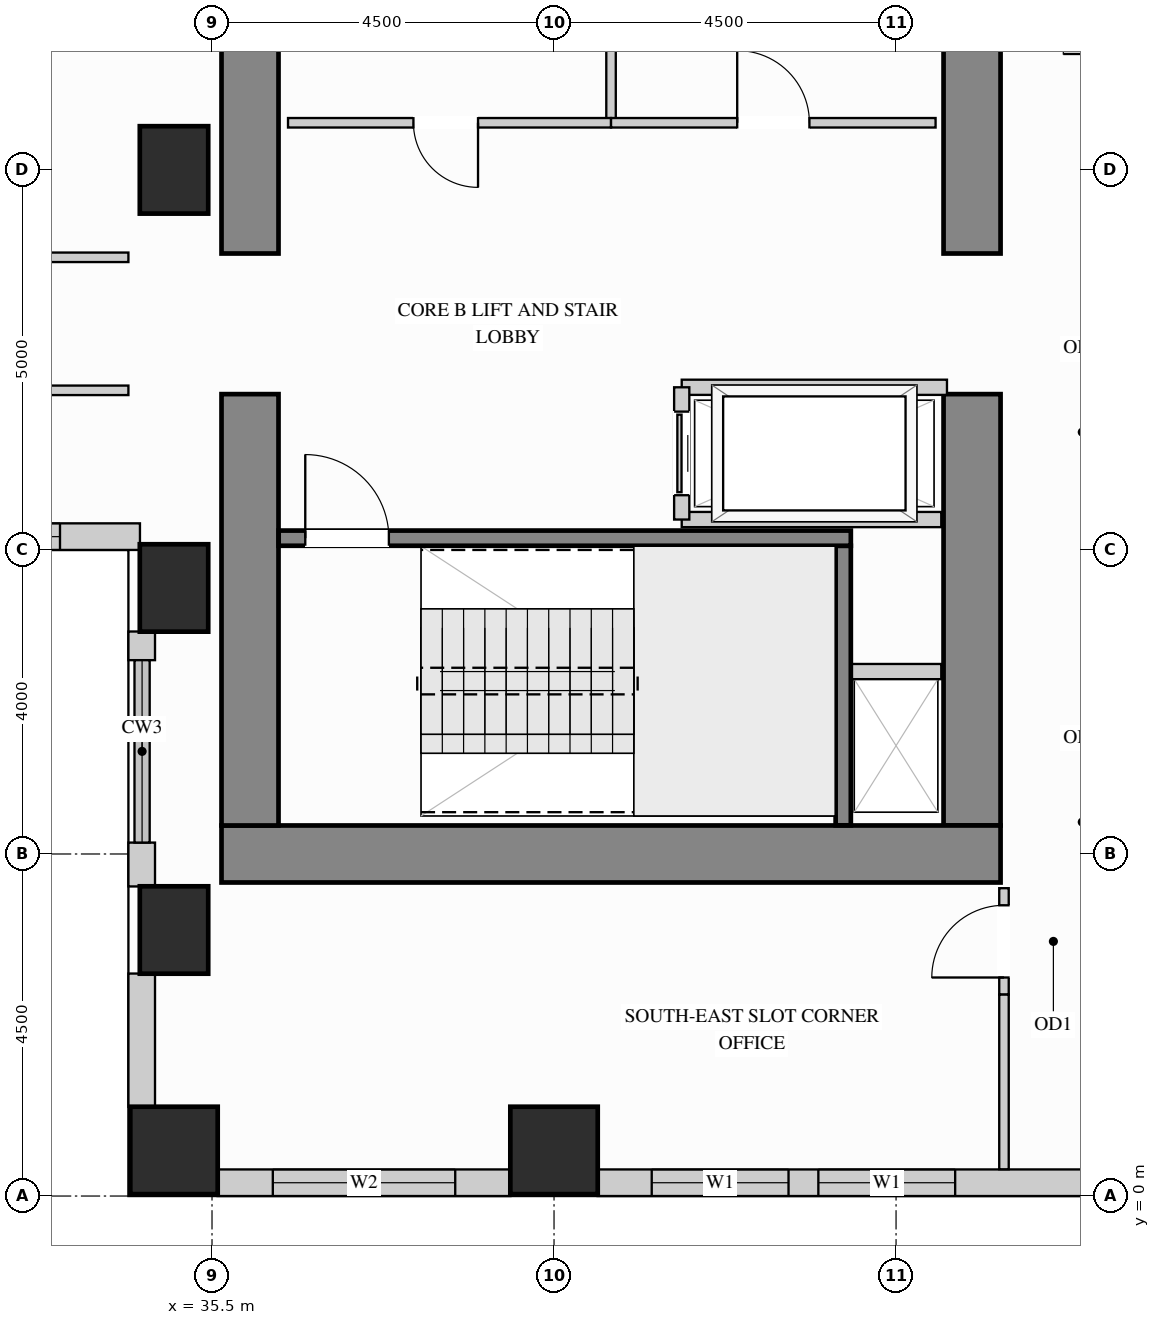
"""IFC4 building model, lengths in metres.
Left out: names, types, materials, properties, quantities, classifications, styles, units other than length and angle.
Written with IfcOpenShell. Run it as: python <this file> out.ifc"""

import sys

from ifc_helpers import new_model, si_unit, direction, frame, frame_2d, origin, origin_2d, place, context, subcontext, project, spatial, rectangle, extrude, source, transform, mapped, element, fill, save


model = new_model("IFC4")
c1 = context("Model", 3, precision=1e-05, world=origin(), true_north=direction((0.0, 1.0)))
c2 = subcontext(c1, "Body", "Model", "MODEL_VIEW")
j1 = project(units=[si_unit("LENGTHUNIT", "METRE"), si_unit("PLANEANGLEUNIT", "RADIAN")], contexts=[c1])
p1 = place(None, origin())
s1 = spatial("IfcSite", under=j1, at=p1, CompositionType="ELEMENT")
p2 = place(p1, origin())
s2 = spatial("IfcBuilding", under=s1, at=p2, CompositionType="ELEMENT")
p3 = place(p2, frame((0.0, 0.0, 117.0)))
s3 = spatial("IfcBuildingStorey", under=s2, at=p3, CompositionType="ELEMENT", Elevation=117.0)
m1 = source(origin(), c2, "Body", "SweptSolid", [
    extrude(rectangle(XDim=0.9, YDim=1.15, at=origin_2d()), origin(), (0.0, 0.0, 1.0), 3.38),
])
for number, where, z_axis, x_axis in (
    (1, (35.0, 13.5, 0.0), (0.0, 0.0, 1.0), (1.0, 0.0, 0.0)),
    (2, (35.0, 3.5, 0.0), (0.0, 0.0, 1.0), (1.0, 0.0, 0.0)),
    (3, (35.0, 8.0, 0.0), (0.0, 0.0, 1.0), (1.0, 0.0, 0.0)),
):
    element("IfcColumn", number, at=place(p3, frame(where, z_axis=z_axis, x_axis=x_axis)), inside=s3, PredefinedType="COLUMN", context=c2, shape_type="MappedRepresentation", body=[
        mapped(m1, transform((0.0, 0.0, 0.0), x_axis=(1.0, 0.0, 0.0), y_axis=(0.0, 1.0, 0.0), z_axis=(0.0, 0.0, 1.0))),
    ])
m2 = source(origin(), c2, "Body", "SweptSolid", [
    extrude(rectangle(XDim=1.15, YDim=1.15, at=origin_2d()), origin(), (0.0, 0.0, 1.0), 3.38),
])
for number, where, z_axis, x_axis in (
    (4, (35.0, 0.6, 0.0), (0.0, 0.0, 1.0), (1.0, 0.0, 0.0)),
    (5, (40.0, 0.6, 0.0), (0.0, 0.0, 1.0), (1.0, 0.0, 0.0)),
):
    element("IfcColumn", number, at=place(p3, frame(where, z_axis=z_axis, x_axis=x_axis)), inside=s3, PredefinedType="COLUMN", context=c2, shape_type="MappedRepresentation", body=[
        mapped(m2, transform((0.0, 0.0, 0.0), x_axis=(1.0, 0.0, 0.0), y_axis=(0.0, 1.0, 0.0), z_axis=(0.0, 0.0, 1.0))),
    ])
m3 = source(origin(), c2, "Body", "SweptSolid", [
    extrude(rectangle(XDim=5.675, YDim=0.75, at=frame_2d((2.837, 0.0))), origin(), (0.0, 0.0, 1.0), 3.38),
])
p4 = place(p3, frame((45.5, 4.875, 0.0), z_axis=(0.0, 0.0, 1.0), x_axis=(0.0, 1.0, 0.0)))
e6 = element("IfcWall", 6, at=p4, inside=s3, PredefinedType="SHEAR", context=c2, shape_type="MappedRepresentation", body=[
    mapped(m3, transform((0.0, 0.0, 0.0), x_axis=(1.0, 0.0, 0.0), y_axis=(0.0, 1.0, 0.0), z_axis=(0.0, 0.0, 1.0))),
])
m4 = source(origin(), c2, "Body", "SweptSolid", [
    extrude(rectangle(XDim=3.725, YDim=0.75, at=frame_2d((1.863, 0.0))), origin(), (0.0, 0.0, 1.0), 3.38),
])
p5 = place(p3, frame((45.5, 12.4, 0.0), z_axis=(0.0, 0.0, 1.0), x_axis=(0.0, 1.0, 0.0)))
e7 = element("IfcWall", 7, at=p5, inside=s3, PredefinedType="SHEAR", context=c2, shape_type="MappedRepresentation", body=[
    mapped(m4, transform((0.0, 0.0, 0.0), x_axis=(1.0, 0.0, 0.0), y_axis=(0.0, 1.0, 0.0), z_axis=(0.0, 0.0, 1.0))),
])
m5 = source(origin(), c2, "Body", "SweptSolid", [
    extrude(rectangle(XDim=10.25, YDim=0.75, at=frame_2d((5.125, 0.0))), origin(), (0.0, 0.0, 1.0), 3.38),
])
p6 = place(p3, frame((35.625, 4.5, 0.0), z_axis=(0.0, 0.0, 1.0), x_axis=(1.0, 0.0, 0.0)))
e8 = element("IfcWall", 8, at=p6, inside=s3, PredefinedType="SHEAR", context=c2, shape_type="MappedRepresentation", body=[
    mapped(m5, transform((0.0, 0.0, 0.0), x_axis=(1.0, 0.0, 0.0), y_axis=(0.0, 1.0, 0.0), z_axis=(0.0, 0.0, 1.0))),
])
p7 = place(p3, frame((36.0, 4.875, 0.0), z_axis=(0.0, 0.0, 1.0), x_axis=(0.0, 1.0, 0.0)))
e9 = element("IfcWall", 9, at=p7, inside=s3, PredefinedType="SHEAR", context=c2, shape_type="MappedRepresentation", body=[
    mapped(m3, transform((0.0, 0.0, 0.0), x_axis=(1.0, 0.0, 0.0), y_axis=(0.0, 1.0, 0.0), z_axis=(0.0, 0.0, 1.0))),
])
p8 = place(p3, frame((36.0, 12.4, 0.0), z_axis=(0.0, 0.0, 1.0), x_axis=(0.0, 1.0, 0.0)))
e10 = element("IfcWall", 10, at=p8, inside=s3, PredefinedType="SHEAR", context=c2, shape_type="MappedRepresentation", body=[
    mapped(m4, transform((0.0, 0.0, 0.0), x_axis=(1.0, 0.0, 0.0), y_axis=(0.0, 1.0, 0.0), z_axis=(0.0, 0.0, 1.0))),
])
p9 = place(p3, frame((30.948, 8.675, 0.0), z_axis=(0.0, 0.0, 1.0), x_axis=(1.0, 0.0, 0.0)))
e11 = element("IfcWall", 11, at=p9, inside=s3, PredefinedType="SOLIDWALL", context=c2, shape_type="SweptSolid", body=[
    extrude(rectangle(XDim=3.604, YDim=0.35, at=frame_2d((1.802, 0.0))), origin(), (0.0, 0.0, 1.0), 3.365),
])
p10 = place(p9, frame((1.052, 0.0, 0.78)))
e12 = element("IfcOpeningElement", 12, at=p10, cuts=e11, PredefinedType="OPENING", context=c2, shape_type="SweptSolid", body=[
    extrude(rectangle(XDim=1.5, YDim=2.0, at=frame_2d((0.75, 1.0))), frame((0.0, 0.185, 0.0), z_axis=(0.0, -1.0, 0.0), x_axis=(1.0, 0.0, 0.0)), (0.0, 0.0, 1.0), 0.37),
])
m6 = source(origin(), c2, "Body", "SweptSolid", [
    extrude(rectangle(XDim=0.377, YDim=0.35, at=frame_2d((0.188, 0.0))), origin(), (0.0, 0.0, 1.0), 3.365),
])
p11 = place(p3, frame((34.575, 7.427, 0.0), z_axis=(0.0, 0.0, 1.0), x_axis=(0.0, -1.0, 0.0)))
e13 = element("IfcWall", 13, at=p11, inside=s3, PredefinedType="SOLIDWALL", context=c2, shape_type="MappedRepresentation", body=[
    mapped(m6, transform((0.0, 0.0, 0.0), x_axis=(1.0, 0.0, 0.0), y_axis=(0.0, 1.0, 0.0), z_axis=(0.0, 0.0, 1.0))),
])
m7 = source(origin(), c2, "Body", "SweptSolid", [
    extrude(rectangle(XDim=0.577, YDim=0.35, at=frame_2d((0.289, 0.0))), origin(), (0.0, 0.0, 1.0), 3.365),
])
p12 = place(p3, frame((34.575, 4.65, 0.0), z_axis=(0.0, 0.0, 1.0), x_axis=(0.0, -1.0, 0.0)))
e14 = element("IfcWall", 14, at=p12, inside=s3, PredefinedType="SOLIDWALL", context=c2, shape_type="MappedRepresentation", body=[
    mapped(m7, transform((0.0, 0.0, 0.0), x_axis=(1.0, 0.0, 0.0), y_axis=(0.0, 1.0, 0.0), z_axis=(0.0, 0.0, 1.0))),
])
m8 = source(origin(), c2, "Body", "SweptSolid", [
    extrude(rectangle(XDim=1.754, YDim=0.35, at=frame_2d((0.877, 0.0))), origin(), (0.0, 0.0, 1.0), 3.365),
])
p13 = place(p3, frame((34.575, 2.927, 0.0), z_axis=(0.0, 0.0, 1.0), x_axis=(0.0, -1.0, 0.0)))
e15 = element("IfcWall", 15, at=p13, inside=s3, PredefinedType="SOLIDWALL", context=c2, shape_type="MappedRepresentation", body=[
    mapped(m8, transform((0.0, 0.0, 0.0), x_axis=(1.0, 0.0, 0.0), y_axis=(0.0, 1.0, 0.0), z_axis=(0.0, 0.0, 1.0))),
])
p14 = place(p3, frame((35.573, 0.175, 0.0), z_axis=(0.0, 0.0, 1.0), x_axis=(1.0, 0.0, 0.0)))
e16 = element("IfcWall", 16, at=p14, inside=s3, PredefinedType="SOLIDWALL", context=c2, shape_type="SweptSolid", body=[
    extrude(rectangle(XDim=3.854, YDim=0.35, at=frame_2d((1.927, 0.0))), origin(), (0.0, 0.0, 1.0), 3.365),
])
p15 = place(p14, frame((0.727, 0.0, 0.78)))
e17 = element("IfcOpeningElement", 17, at=p15, cuts=e16, PredefinedType="OPENING", context=c2, shape_type="SweptSolid", body=[
    extrude(rectangle(XDim=2.4, YDim=2.1, at=frame_2d((1.2, 1.05))), frame((0.0, 0.185, 0.0), z_axis=(0.0, -1.0, 0.0), x_axis=(1.0, 0.0, 0.0)), (0.0, 0.0, 1.0), 0.37),
])
p16 = place(p3, frame((40.573, 0.175, 0.0), z_axis=(0.0, 0.0, 1.0), x_axis=(1.0, 0.0, 0.0)))
e18 = element("IfcWall", 18, at=p16, inside=s3, PredefinedType="SOLIDWALL", context=c2, shape_type="SweptSolid", body=[
    extrude(rectangle(XDim=6.454, YDim=0.35, at=frame_2d((3.227, 0.0))), origin(), (0.0, 0.0, 1.0), 3.365),
])
p17 = place(p16, frame((0.712, 0.0, 0.78)))
e19 = element("IfcOpeningElement", 19, at=p17, cuts=e18, PredefinedType="OPENING", context=c2, shape_type="SweptSolid", body=[
    extrude(rectangle(XDim=1.8, YDim=2.1, at=frame_2d((0.9, 1.05))), frame((0.0, 0.185, 0.0), z_axis=(0.0, -1.0, 0.0), x_axis=(1.0, 0.0, 0.0)), (0.0, 0.0, 1.0), 0.37),
])
p18 = place(p16, frame((2.905, 0.0, 0.78)))
e20 = element("IfcOpeningElement", 20, at=p18, cuts=e18, PredefinedType="OPENING", context=c2, shape_type="SweptSolid", body=[
    extrude(rectangle(XDim=1.8, YDim=2.1, at=frame_2d((0.9, 1.05))), frame((0.0, 0.185, 0.0), z_axis=(0.0, -1.0, 0.0), x_axis=(1.0, 0.0, 0.0)), (0.0, 0.0, 1.0), 0.37),
])
m9 = source(origin(), c2, "Body", "SweptSolid", [
    extrude(rectangle(XDim=1.93, YDim=0.125, at=frame_2d((0.965, 0.0))), origin(), (0.0, 0.0, 1.0), 3.365),
])
p19 = place(p3, frame((40.75, 14.12, 0.0), z_axis=(0.0, 0.0, 1.0), x_axis=(0.0, 1.0, 0.0)))
e21 = element("IfcWall", 21, at=p19, inside=s3, PredefinedType="PARTITIONING", context=c2, shape_type="MappedRepresentation", body=[
    mapped(m9, transform((0.0, 0.0, 0.0), x_axis=(1.0, 0.0, 0.0), y_axis=(0.0, 1.0, 0.0), z_axis=(0.0, 0.0, 1.0))),
])
p20 = place(p3, frame((36.5, 14.12, 0.0), z_axis=(0.0, 0.0, 1.0), x_axis=(1.0, 0.0, 0.0)))
e22 = element("IfcWall", 22, at=p20, inside=s3, PredefinedType="PARTITIONING", context=c2, shape_type="SweptSolid", body=[
    extrude(rectangle(XDim=4.25, YDim=0.125, at=frame_2d((2.125, 0.0))), origin(), (0.0, 0.0, 1.0), 3.365),
])
p21 = place(p20, frame((1.65, 0.0, 0.0)))
e23 = element("IfcOpeningElement", 23, at=p21, cuts=e22, PredefinedType="OPENING", context=c2, shape_type="SweptSolid", body=[
    extrude(rectangle(XDim=0.85, YDim=2.1, at=frame_2d((0.425, 1.05))), frame((0.0, 0.073, 0.0), z_axis=(0.0, -1.0, 0.0), x_axis=(1.0, 0.0, 0.0)), (0.0, 0.0, 1.0), 0.145),
])
p22 = place(p3, frame((40.75, 14.12, 0.0), z_axis=(0.0, 0.0, 1.0), x_axis=(1.0, 0.0, 0.0)))
e24 = element("IfcWall", 24, at=p22, inside=s3, PredefinedType="PARTITIONING", context=c2, shape_type="SweptSolid", body=[
    extrude(rectangle(XDim=4.27, YDim=0.125, at=frame_2d((2.135, 0.0))), origin(), (0.0, 0.0, 1.0), 3.365),
])
p23 = place(p22, frame((1.66, 0.0, 0.0)))
e25 = element("IfcOpeningElement", 25, at=p23, cuts=e24, PredefinedType="OPENING", context=c2, shape_type="SweptSolid", body=[
    extrude(rectangle(XDim=0.95, YDim=2.15, at=frame_2d((0.475, 1.075))), frame((0.0, 0.073, 0.0), z_axis=(0.0, -1.0, 0.0), x_axis=(1.0, 0.0, 0.0)), (0.0, 0.0, 1.0), 0.145),
])
p24 = place(p3, frame((45.92, 2.65, 0.0), z_axis=(0.0, 0.0, 1.0), x_axis=(0.0, 1.0, 0.0)))
e26 = element("IfcWall", 26, at=p24, inside=s3, PredefinedType="PARTITIONING", context=c2, shape_type="SweptSolid", body=[
    extrude(rectangle(XDim=1.4, YDim=0.125, at=frame_2d((0.7, 0.0))), origin(), (0.0, 0.0, 1.0), 3.365),
])
p25 = place(p24, frame((0.225, 0.0, 0.0)))
e27 = element("IfcOpeningElement", 27, at=p25, cuts=e26, PredefinedType="OPENING", context=c2, shape_type="SweptSolid", body=[
    extrude(rectangle(XDim=0.95, YDim=2.15, at=frame_2d((0.475, 1.075))), frame((0.0, 0.073, 0.0), z_axis=(0.0, -1.0, 0.0), x_axis=(1.0, 0.0, 0.0)), (0.0, 0.0, 1.0), 0.145),
])
m10 = source(origin(), c2, "Body", "SweptSolid", [
    extrude(rectangle(XDim=2.298, YDim=0.125, at=frame_2d((1.149, 0.0))), origin(), (0.0, 0.0, 1.0), 3.365),
])
p26 = place(p3, frame((45.92, 0.352, 0.0), z_axis=(0.0, 0.0, 1.0), x_axis=(0.0, 1.0, 0.0)))
e28 = element("IfcWall", 28, at=p26, inside=s3, PredefinedType="PARTITIONING", context=c2, shape_type="MappedRepresentation", body=[
    mapped(m10, transform((0.0, 0.0, 0.0), x_axis=(1.0, 0.0, 0.0), y_axis=(0.0, 1.0, 0.0), z_axis=(0.0, 0.0, 1.0))),
])
p27 = place(p3, frame((29.85, 12.35, 0.0), z_axis=(0.0, 0.0, 1.0), x_axis=(1.0, 0.0, 0.0)))
e29 = element("IfcWall", 29, at=p27, inside=s3, PredefinedType="PARTITIONING", context=c2, shape_type="SweptSolid", body=[
    extrude(rectangle(XDim=4.55, YDim=0.125, at=frame_2d((2.275, 0.0))), origin(), (0.0, 0.0, 1.0), 3.365),
])
p28 = place(p27, frame((1.8, 0.0, 0.0)))
e30 = element("IfcOpeningElement", 30, at=p28, cuts=e29, PredefinedType="OPENING", context=c2, shape_type="SweptSolid", body=[
    extrude(rectangle(XDim=0.95, YDim=2.15, at=frame_2d((0.475, 1.075))), frame((0.0, 0.073, 0.0), z_axis=(0.0, -1.0, 0.0), x_axis=(1.0, 0.0, 0.0)), (0.0, 0.0, 1.0), 0.145),
])
p29 = place(p3, frame((19.5, 10.6, 0.0), z_axis=(0.0, 0.0, 1.0), x_axis=(1.0, 0.0, 0.0)))
e31 = element("IfcWall", 31, at=p29, inside=s3, PredefinedType="PARTITIONING", context=c2, shape_type="SweptSolid", body=[
    extrude(rectangle(XDim=14.9, YDim=0.125, at=frame_2d((7.45, 0.0))), origin(), (0.0, 0.0, 1.0), 3.365),
])
p30 = place(p29, frame((6.975, 0.0, 0.0)))
e32 = element("IfcOpeningElement", 32, at=p30, cuts=e31, PredefinedType="OPENING", context=c2, shape_type="SweptSolid", body=[
    extrude(rectangle(XDim=0.95, YDim=2.15, at=frame_2d((0.475, 1.075))), frame((0.0, 0.073, 0.0), z_axis=(0.0, -1.0, 0.0), x_axis=(1.0, 0.0, 0.0)), (0.0, 0.0, 1.0), 0.145),
])
m11 = source(origin(), c2, "Body", "SweptSolid", [
    extrude(rectangle(XDim=1.245, YDim=0.2, at=frame_2d((0.623, 0.0))), origin(), (0.0, 0.0, 1.0), 3.365),
])
p31 = place(p3, frame((43.85, 6.9, 0.0), z_axis=(0.0, 0.0, 1.0), x_axis=(1.0, 0.0, 0.0)))
e33 = element("IfcWall", 33, at=p31, inside=s3, PredefinedType="PARTITIONING", context=c2, shape_type="MappedRepresentation", body=[
    mapped(m11, transform((0.0, 0.0, 0.0), x_axis=(1.0, 0.0, 0.0), y_axis=(0.0, 1.0, 0.0), z_axis=(0.0, 0.0, 1.0))),
])
m12 = source(origin(), c2, "Body", "SweptSolid", [
    extrude(rectangle(XDim=3.49, YDim=0.2, at=frame_2d((1.745, 0.0))), origin(), (0.0, 0.0, 1.0), 3.365),
])
p32 = place(p3, frame((41.68, 10.64, 0.0), z_axis=(0.0, 0.0, 1.0), x_axis=(1.0, 0.0, 0.0)))
e34 = element("IfcWall", 34, at=p32, inside=s3, PredefinedType="PARTITIONING", context=c2, shape_type="MappedRepresentation", body=[
    mapped(m12, transform((0.0, 0.0, 0.0), x_axis=(1.0, 0.0, 0.0), y_axis=(0.0, 1.0, 0.0), z_axis=(0.0, 0.0, 1.0))),
])
m13 = source(origin(), c2, "Body", "SweptSolid", [
    extrude(rectangle(XDim=3.415, YDim=0.2, at=frame_2d((1.708, 0.0))), origin(), (0.0, 0.0, 1.0), 3.365),
])
p33 = place(p3, frame((41.68, 8.9, 0.0), z_axis=(0.0, 0.0, 1.0), x_axis=(1.0, 0.0, 0.0)))
e35 = element("IfcWall", 35, at=p33, inside=s3, PredefinedType="PARTITIONING", context=c2, shape_type="MappedRepresentation", body=[
    mapped(m13, transform((0.0, 0.0, 0.0), x_axis=(1.0, 0.0, 0.0), y_axis=(0.0, 1.0, 0.0), z_axis=(0.0, 0.0, 1.0))),
])
p34 = place(p3, frame((41.68, 8.9, 0.0), z_axis=(0.0, 0.0, 1.0), x_axis=(0.0, 1.0, 0.0)))
e36 = element("IfcWall", 36, at=p34, inside=s3, PredefinedType="PARTITIONING", context=c2, shape_type="SweptSolid", body=[
    extrude(rectangle(XDim=1.74, YDim=0.2, at=frame_2d((0.87, 0.0))), origin(), (0.0, 0.0, 1.0), 3.365),
])
p35 = place(p34, frame((0.32, 0.0, 0.0)))
e37 = element("IfcOpeningElement", 37, at=p35, cuts=e36, PredefinedType="OPENING", context=c2, shape_type="SweptSolid", body=[
    extrude(rectangle(XDim=1.1, YDim=2.2, at=frame_2d((0.55, 1.1))), frame((0.0, 0.11, 0.0), z_axis=(0.0, -1.0, 0.0), x_axis=(1.0, 0.0, 0.0)), (0.0, 0.0, 1.0), 0.22),
])
m14 = source(origin(), c2, "Body", "SweptSolid", [
    extrude(rectangle(XDim=3.678, YDim=0.2, at=frame_2d((1.839, 0.0))), origin(), (0.0, 0.0, 1.0), 3.38),
])
p36 = place(p3, frame((43.805, 4.877, 0.0), z_axis=(0.0, 0.0, 1.0), x_axis=(0.0, 1.0, 0.0)))
e38 = element("IfcWall", 38, at=p36, inside=s3, PredefinedType="SHEAR", context=c2, shape_type="MappedRepresentation", body=[
    mapped(m14, transform((0.0, 0.0, 0.0), x_axis=(1.0, 0.0, 0.0), y_axis=(0.0, 1.0, 0.0), z_axis=(0.0, 0.0, 1.0))),
])
p37 = place(p3, frame((36.377, 8.655, 0.0), z_axis=(0.0, 0.0, 1.0), x_axis=(1.0, 0.0, 0.0)))
e39 = element("IfcWall", 39, at=p37, inside=s3, PredefinedType="SHEAR", context=c2, shape_type="SweptSolid", body=[
    extrude(rectangle(XDim=7.528, YDim=0.2, at=frame_2d((3.764, 0.0))), origin(), (0.0, 0.0, 1.0), 3.38),
])
p38 = place(p37, frame((0.35, 0.0, 0.0)))
e40 = element("IfcOpeningElement", 40, at=p38, cuts=e39, PredefinedType="OPENING", context=c2, shape_type="SweptSolid", body=[
    extrude(rectangle(XDim=1.1, YDim=2.15, at=frame_2d((0.55, 1.075))), frame((0.0, 0.11, 0.0), z_axis=(0.0, -1.0, 0.0), x_axis=(1.0, 0.0, 0.0)), (0.0, 0.0, 1.0), 0.22),
])
m15 = source(origin(), c2, "Body", "SweptSolid", [
    extrude(rectangle(XDim=1.1, YDim=2.2, at=frame_2d((0.55, 1.1))), frame((0.0, 0.025, 0.0), z_axis=(0.0, -1.0, 0.0), x_axis=(1.0, 0.0, 0.0)), (0.0, 0.0, 1.0), 0.05),
])
p39 = place(p35, origin())
e41 = element("IfcDoor", 41, at=p39, inside=s3, OperationType="SLIDING_TO_LEFT", PredefinedType="DOOR", context=c2, shape_type="MappedRepresentation", body=[
    mapped(m15, transform((0.0, 0.0, 0.0), x_axis=(1.0, 0.0, 0.0), y_axis=(0.0, 1.0, 0.0), z_axis=(0.0, 0.0, 1.0))),
])
fill(e37, e41)
m16 = source(origin(), c2, "Body", "SweptSolid", [
    extrude(rectangle(XDim=0.95, YDim=2.15, at=frame_2d((0.475, 1.075))), frame((0.0, 0.025, 0.0), z_axis=(0.0, -1.0, 0.0), x_axis=(1.0, 0.0, 0.0)), (0.0, 0.0, 1.0), 0.05),
])
p40 = place(p23, origin())
e42 = element("IfcDoor", 42, at=p40, inside=s3, OperationType="SINGLE_SWING_LEFT", PredefinedType="DOOR", context=c2, shape_type="MappedRepresentation", body=[
    mapped(m16, transform((0.0, 0.0, 0.0), x_axis=(1.0, 0.0, 0.0), y_axis=(0.0, 1.0, 0.0), z_axis=(0.0, 0.0, 1.0))),
])
fill(e25, e42)
p41 = place(p25, origin())
e43 = element("IfcDoor", 43, at=p41, inside=s3, OperationType="SINGLE_SWING_LEFT", PredefinedType="DOOR", context=c2, shape_type="MappedRepresentation", body=[
    mapped(m16, transform((0.0, 0.0, 0.0), x_axis=(1.0, 0.0, 0.0), y_axis=(0.0, 1.0, 0.0), z_axis=(0.0, 0.0, 1.0))),
])
fill(e27, e43)
m17 = source(origin(), c2, "Body", "SweptSolid", [
    extrude(rectangle(XDim=0.85, YDim=2.1, at=frame_2d((0.425, 1.05))), frame((0.0, 0.025, 0.0), z_axis=(0.0, -1.0, 0.0), x_axis=(1.0, 0.0, 0.0)), (0.0, 0.0, 1.0), 0.05),
])
p42 = place(p21, origin())
e44 = element("IfcDoor", 44, at=p42, inside=s3, OperationType="SINGLE_SWING_RIGHT", PredefinedType="DOOR", context=c2, shape_type="MappedRepresentation", body=[
    mapped(m17, transform((0.0, 0.0, 0.0), x_axis=(1.0, 0.0, 0.0), y_axis=(0.0, 1.0, 0.0), z_axis=(0.0, 0.0, 1.0))),
])
fill(e23, e44)
m18 = source(origin(), c2, "Body", "SweptSolid", [
    extrude(rectangle(XDim=1.1, YDim=2.15, at=frame_2d((0.55, 1.075))), frame((0.0, 0.025, 0.0), z_axis=(0.0, -1.0, 0.0), x_axis=(1.0, 0.0, 0.0)), (0.0, 0.0, 1.0), 0.05),
])
p43 = place(p38, origin())
e45 = element("IfcDoor", 45, at=p43, inside=s3, OperationType="SINGLE_SWING_LEFT", PredefinedType="DOOR", context=c2, shape_type="MappedRepresentation", body=[
    mapped(m18, transform((0.0, 0.0, 0.0), x_axis=(1.0, 0.0, 0.0), y_axis=(0.0, 1.0, 0.0), z_axis=(0.0, 0.0, 1.0))),
])
fill(e40, e45)
m19 = source(origin(), c2, "Body", "SweptSolid", [
    extrude(rectangle(XDim=1.8, YDim=2.1, at=frame_2d((0.9, 1.05))), frame((0.0, 0.03, 0.0), z_axis=(0.0, -1.0, 0.0), x_axis=(1.0, 0.0, 0.0)), (0.0, 0.0, 1.0), 0.06),
])
p44 = place(p17, origin())
e46 = element("IfcWindow", 46, at=p44, inside=s3, PartitioningType="SINGLE_PANEL", PredefinedType="WINDOW", context=c2, shape_type="MappedRepresentation", body=[
    mapped(m19, transform((0.0, 0.0, 0.0), x_axis=(1.0, 0.0, 0.0), y_axis=(0.0, 1.0, 0.0), z_axis=(0.0, 0.0, 1.0))),
])
fill(e19, e46)
p45 = place(p18, origin())
e47 = element("IfcWindow", 47, at=p45, inside=s3, PartitioningType="SINGLE_PANEL", PredefinedType="WINDOW", context=c2, shape_type="MappedRepresentation", body=[
    mapped(m19, transform((0.0, 0.0, 0.0), x_axis=(1.0, 0.0, 0.0), y_axis=(0.0, 1.0, 0.0), z_axis=(0.0, 0.0, 1.0))),
])
fill(e20, e47)
m20 = source(origin(), c2, "Body", "SweptSolid", [
    extrude(rectangle(XDim=2.4, YDim=2.1, at=frame_2d((1.2, 1.05))), frame((0.0, 0.03, 0.0), z_axis=(0.0, -1.0, 0.0), x_axis=(1.0, 0.0, 0.0)), (0.0, 0.0, 1.0), 0.06),
])
p46 = place(p15, origin())
e48 = element("IfcWindow", 48, at=p46, inside=s3, PartitioningType="SINGLE_PANEL", PredefinedType="WINDOW", context=c2, shape_type="MappedRepresentation", body=[
    mapped(m20, transform((0.0, 0.0, 0.0), x_axis=(1.0, 0.0, 0.0), y_axis=(0.0, 1.0, 0.0), z_axis=(0.0, 0.0, 1.0))),
])
fill(e17, e48)
m21 = source(origin(), c2, "Body", "SweptSolid", [
    extrude(rectangle(XDim=1.5, YDim=2.0, at=frame_2d((0.75, 1.0))), frame((0.0, 0.03, 0.0), z_axis=(0.0, -1.0, 0.0), x_axis=(1.0, 0.0, 0.0)), (0.0, 0.0, 1.0), 0.06),
])
p47 = place(p10, origin())
e49 = element("IfcWindow", 49, at=p47, inside=s3, PartitioningType="SINGLE_PANEL", PredefinedType="WINDOW", context=c2, shape_type="MappedRepresentation", body=[
    mapped(m21, transform((0.0, 0.0, 0.0), x_axis=(1.0, 0.0, 0.0), y_axis=(0.0, 1.0, 0.0), z_axis=(0.0, 0.0, 1.0))),
])
fill(e12, e49)
save(model, sys.argv[1])
